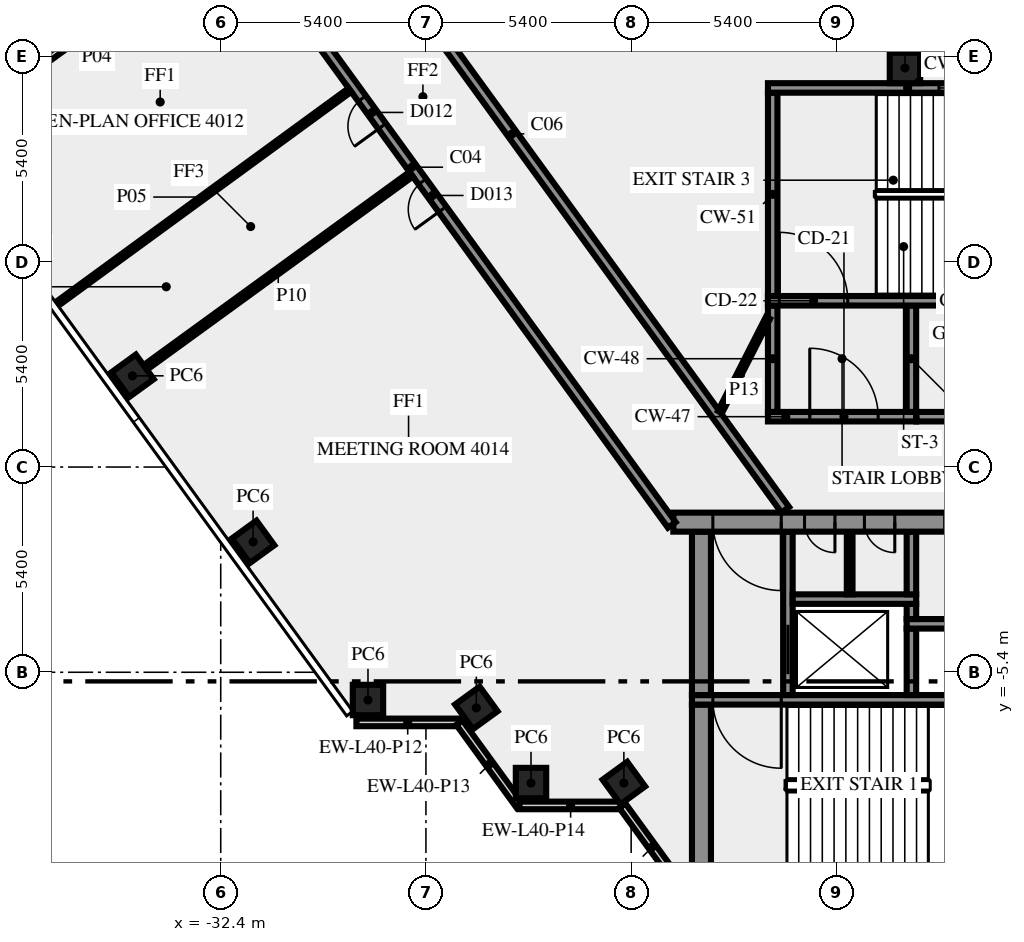
"""IFC4 building model, lengths in metres.
Left out: names, types, materials, properties, quantities, classifications, styles, units other than length and angle.
Written with IfcOpenShell. Run it as: python <this file> out.ifc"""

import sys

from ifc_helpers import new_model, si_unit, direction, frame, frame_2d, origin, origin_2d, place, context, subcontext, project, spatial, rectangle, extrude, element, fill, save


model = new_model("IFC4")
c1 = context("Model", 3, precision=1e-05, world=origin(), true_north=direction((0.0, 1.0)))
c2 = subcontext(c1, "Body", "Model", "MODEL_VIEW")
j1 = project(units=[si_unit("LENGTHUNIT", "METRE"), si_unit("PLANEANGLEUNIT", "RADIAN")], contexts=[c1])
p1 = place(None, origin())
s1 = spatial("IfcSite", under=j1, at=p1, CompositionType="ELEMENT")
p2 = place(p1, origin())
s2 = spatial("IfcBuilding", under=s1, at=p2, CompositionType="ELEMENT")
p3 = place(p2, frame((0.0, 0.0, 172.0)))
s3 = spatial("IfcBuildingStorey", under=s2, at=p3, CompositionType="ELEMENT", Elevation=172.0)
for number, where, z_axis, x_axis in (
    (1, (-34.722, 2.4, 0.0), (0.0, 0.0, 1.0), (0.588, -0.809, 0.0)),
    (2, (-31.548, -1.969, 0.0), (0.0, 0.0, 1.0), (0.588, -0.809, 0.0)),
    (3, (-28.525, -6.13, 0.0), (0.0, 0.0, 1.0), (1.0, 0.0, 0.0)),
    (4, (-25.674, -6.337, 0.0), (0.0, 0.0, 1.0), (0.588, -0.809, 0.0)),
    (5, (-24.235, -8.315, 0.0), (0.0, 0.0, 1.0), (1.0, 0.0, 0.0)),
    (6, (-21.792, -8.315, 0.0), (0.0, 0.0, 1.0), (0.588, -0.809, 0.0)),
    (7, (-14.395, 10.5, 0.0), (0.0, 0.0, 1.0), (-1.0, 0.0, 0.0)),
):
    element("IfcColumn", number, at=place(p3, frame(where, z_axis=z_axis, x_axis=x_axis)), inside=s3, PredefinedType="COLUMN", context=c2, shape_type="SweptSolid", body=[
        extrude(rectangle(XDim=0.8, YDim=0.8, at=origin_2d()), origin(), (0.0, 0.0, 1.0), 3.65),
    ])
p4 = place(p3, frame((-28.83, -6.719, 0.0), z_axis=(0.0, 0.0, 1.0), x_axis=(1.0, 0.0, 0.0)))
e8 = element("IfcWall", 8, at=p4, inside=s3, PredefinedType="SOLIDWALL", context=c2, shape_type="SweptSolid", body=[
    extrude(rectangle(XDim=2.7, YDim=0.2, at=frame_2d((1.35, 0.0))), origin(), (0.0, 0.0, 1.0), 3.65),
])
p5 = place(p3, frame((-26.12, -6.724, 0.0), z_axis=(0.0, 0.0, 1.0), x_axis=(0.587720002413, -0.809064397168, 0.0)))
e9 = element("IfcWall", 9, at=p5, inside=s3, PredefinedType="SOLIDWALL", context=c2, shape_type="SweptSolid", body=[
    extrude(rectangle(XDim=2.7, YDim=0.2, at=frame_2d((1.35, 0.0))), origin(), (0.0, 0.0, 1.0), 3.65),
])
p6 = place(p3, frame((-24.543, -8.904, 0.0), z_axis=(0.0, 0.0, 1.0), x_axis=(1.0, 0.0, 0.0)))
e10 = element("IfcWall", 10, at=p6, inside=s3, PredefinedType="SOLIDWALL", context=c2, shape_type="SweptSolid", body=[
    extrude(rectangle(XDim=2.7, YDim=0.2, at=frame_2d((1.35, 0.0))), origin(), (0.0, 0.0, 1.0), 3.65),
])
p7 = place(p3, frame((-21.833, -8.909, 0.0), z_axis=(0.0, 0.0, 1.0), x_axis=(0.587766567315, -0.809030569476, 0.0)))
e11 = element("IfcWall", 11, at=p7, inside=s3, PredefinedType="SOLIDWALL", context=c2, shape_type="SweptSolid", body=[
    extrude(rectangle(XDim=2.688, YDim=0.2, at=frame_2d((1.344, 0.0))), origin(), (0.0, 0.0, 1.0), 3.65),
])
p8 = place(p3, frame((-19.75, -10.5, 0.0), z_axis=(0.0, 0.0, 1.0), x_axis=(0.0, 1.0, 0.0)))
e12 = element("IfcWall", 12, at=p8, inside=s3, PredefinedType="SHEAR", context=c2, shape_type="SweptSolid", body=[
    extrude(rectangle(XDim=4.25, YDim=0.5, at=frame_2d((2.125, 0.0))), origin(), (0.0, 0.0, 1.0), 3.65),
])
p9 = place(p3, frame((-9.8, -6.125, 0.0), z_axis=(0.0, 0.0, 1.0), x_axis=(-1.0, 0.0, 0.0)))
e13 = element("IfcWall", 13, at=p9, inside=s3, PredefinedType="SHEAR", context=c2, shape_type="SweptSolid", body=[
    extrude(rectangle(XDim=10.2, YDim=0.25, at=frame_2d((5.1, 0.0))), origin(), (0.0, 0.0, 1.0), 3.65),
])
p10 = place(p9, frame((7.85, 0.0, 0.0)))
e14 = element("IfcOpeningElement", 14, at=p10, cuts=e13, PredefinedType="OPENING", context=c2, shape_type="SweptSolid", body=[
    extrude(rectangle(XDim=1.8, YDim=2.1, at=frame_2d((0.9, 1.05))), frame((0.0, 0.135, 0.0), z_axis=(0.0, -1.0, 0.0), x_axis=(1.0, 0.0, 0.0)), (0.0, 0.0, 1.0), 0.27),
])
p11 = place(p3, frame((-19.75, -6.0, 0.0), z_axis=(0.0, 0.0, 1.0), x_axis=(0.0, 1.0, 0.0)))
e15 = element("IfcWall", 15, at=p11, inside=s3, PredefinedType="SHEAR", context=c2, shape_type="SweptSolid", body=[
    extrude(rectangle(XDim=4.3, YDim=0.5, at=frame_2d((2.15, 0.0))), origin(), (0.0, 0.0, 1.0), 3.65),
])
p12 = place(p3, frame((-17.475, -6.0, 0.0), z_axis=(0.0, 0.0, 1.0), x_axis=(0.0, 1.0, 0.0)))
e16 = element("IfcWall", 16, at=p12, inside=s3, PredefinedType="SHEAR", context=c2, shape_type="SweptSolid", body=[
    extrude(rectangle(XDim=4.3, YDim=0.25, at=frame_2d((2.15, 0.0))), origin(), (0.0, 0.0, 1.0), 3.65),
])
p13 = place(p12, frame((0.55, 0.0, 0.0)))
e17 = element("IfcOpeningElement", 17, at=p13, cuts=e16, PredefinedType="OPENING", context=c2, shape_type="SweptSolid", body=[
    extrude(rectangle(XDim=1.3, YDim=2.1, at=frame_2d((0.65, 1.05))), frame((0.0, 0.135, 0.0), z_axis=(0.0, -1.0, 0.0), x_axis=(1.0, 0.0, 0.0)), (0.0, 0.0, 1.0), 0.27),
])
p14 = place(p3, frame((-14.225, -6.0, 0.0), z_axis=(0.0, 0.0, 1.0), x_axis=(0.0, 1.0, 0.0)))
e18 = element("IfcWall", 18, at=p14, inside=s3, PredefinedType="SHEAR", context=c2, shape_type="SweptSolid", body=[
    extrude(rectangle(XDim=1.75, YDim=0.25, at=frame_2d((0.875, 0.0))), origin(), (0.0, 0.0, 1.0), 3.65),
])
p15 = place(p3, frame((-14.35, -4.125, 0.0), z_axis=(0.0, 0.0, 1.0), x_axis=(1.0, 0.0, 0.0)))
e19 = element("IfcWall", 19, at=p15, inside=s3, PredefinedType="SHEAR", context=c2, shape_type="SweptSolid", body=[
    extrude(rectangle(XDim=10.4, YDim=0.25, at=frame_2d((5.2, 0.0))), origin(), (0.0, 0.0, 1.0), 3.65),
])
p16 = place(p3, frame((-14.225, -4.0, 0.0), z_axis=(0.0, 0.0, 1.0), x_axis=(0.0, 1.0, 0.0)))
e20 = element("IfcWall", 20, at=p16, inside=s3, PredefinedType="SHEAR", context=c2, shape_type="SweptSolid", body=[
    extrude(rectangle(XDim=0.4, YDim=0.25, at=frame_2d((0.2, 0.0))), origin(), (0.0, 0.0, 1.0), 3.65),
])
p17 = place(p3, frame((-17.35, -3.475, 0.0), z_axis=(0.0, 0.0, 1.0), x_axis=(1.0, 0.0, 0.0)))
e21 = element("IfcWall", 21, at=p17, inside=s3, PredefinedType="SHEAR", context=c2, shape_type="SweptSolid", body=[
    extrude(rectangle(XDim=3.25, YDim=0.25, at=frame_2d((1.625, 0.0))), origin(), (0.0, 0.0, 1.0), 3.65),
])
p18 = place(p3, frame((-15.85, -3.35, 0.0), z_axis=(0.0, 0.0, 1.0), x_axis=(0.0, 1.0, 0.0)))
e22 = element("IfcWall", 22, at=p18, inside=s3, PredefinedType="PARTITIONING", context=c2, shape_type="SweptSolid", body=[
    extrude(rectangle(XDim=1.65, YDim=0.15, at=frame_2d((0.825, 0.0))), origin(), (0.0, 0.0, 1.0), 3.65),
])
p19 = place(p3, frame((-14.225, -3.35, 0.0), z_axis=(0.0, 0.0, 1.0), x_axis=(0.0, 1.0, 0.0)))
e23 = element("IfcWall", 23, at=p19, inside=s3, PredefinedType="SHEAR", context=c2, shape_type="SweptSolid", body=[
    extrude(rectangle(XDim=1.65, YDim=0.25, at=frame_2d((0.825, 0.0))), origin(), (0.0, 0.0, 1.0), 3.65),
])
p20 = place(p3, frame((20.49, -1.45, 0.0), z_axis=(0.0, 0.0, 1.0), x_axis=(-1.0, 0.0, 0.0)))
e24 = element("IfcWall", 24, at=p20, inside=s3, PredefinedType="SHEAR", context=c2, shape_type="SweptSolid", body=[
    extrude(rectangle(XDim=40.98, YDim=0.5, at=frame_2d((20.49, 0.0))), origin(), (0.0, 0.0, 1.0), 3.65),
])
p21 = place(p20, frame((38.14, 0.0, 0.0)))
e25 = element("IfcOpeningElement", 25, at=p21, cuts=e24, PredefinedType="OPENING", context=c2, shape_type="SweptSolid", body=[
    extrude(rectangle(XDim=1.8, YDim=2.1, at=frame_2d((0.9, 1.05))), frame((0.0, 0.26, 0.0), z_axis=(0.0, -1.0, 0.0), x_axis=(1.0, 0.0, 0.0)), (0.0, 0.0, 1.0), 0.52),
])
p22 = place(p20, frame((36.728, 0.0, 0.0)))
e26 = element("IfcOpeningElement", 26, at=p22, cuts=e24, PredefinedType="OPENING", context=c2, shape_type="SweptSolid", body=[
    extrude(rectangle(XDim=0.8, YDim=2.1, at=frame_2d((0.4, 1.05))), frame((0.0, 0.26, 0.0), z_axis=(0.0, -1.0, 0.0), x_axis=(1.0, 0.0, 0.0)), (0.0, 0.0, 1.0), 0.52),
])
p23 = place(p20, frame((35.153, 0.0, 0.0)))
e27 = element("IfcOpeningElement", 27, at=p23, cuts=e24, PredefinedType="OPENING", context=c2, shape_type="SweptSolid", body=[
    extrude(rectangle(XDim=0.8, YDim=2.1, at=frame_2d((0.4, 1.05))), frame((0.0, 0.26, 0.0), z_axis=(0.0, -1.0, 0.0), x_axis=(1.0, 0.0, 0.0)), (0.0, 0.0, 1.0), 0.52),
])
p24 = place(p20, frame((32.94, 0.0, 0.0)))
e28 = element("IfcOpeningElement", 28, at=p24, cuts=e24, PredefinedType="OPENING", context=c2, shape_type="SweptSolid", body=[
    extrude(rectangle(XDim=0.9, YDim=2.1, at=frame_2d((0.45, 1.05))), frame((0.0, 0.26, 0.0), z_axis=(0.0, -1.0, 0.0), x_axis=(1.0, 0.0, 0.0)), (0.0, 0.0, 1.0), 0.52),
])
p25 = place(p20, frame((27.84, 0.0, 0.0)))
e29 = element("IfcOpeningElement", 29, at=p25, cuts=e24, PredefinedType="OPENING", context=c2, shape_type="SweptSolid", body=[
    extrude(rectangle(XDim=0.9, YDim=2.1, at=frame_2d((0.45, 1.05))), frame((0.0, 0.26, 0.0), z_axis=(0.0, -1.0, 0.0), x_axis=(1.0, 0.0, 0.0)), (0.0, 0.0, 1.0), 0.52),
])
p26 = place(p20, frame((21.765, 0.0, 0.0)))
e30 = element("IfcOpeningElement", 30, at=p26, cuts=e24, PredefinedType="OPENING", context=c2, shape_type="SweptSolid", body=[
    extrude(rectangle(XDim=2.0, YDim=2.1, at=frame_2d((1.0, 1.05))), frame((0.0, 0.26, 0.0), z_axis=(0.0, -1.0, 0.0), x_axis=(1.0, 0.0, 0.0)), (0.0, 0.0, 1.0), 0.52),
])
p27 = place(p20, frame((7.14, 0.0, 0.0)))
e31 = element("IfcOpeningElement", 31, at=p27, cuts=e24, PredefinedType="OPENING", context=c2, shape_type="SweptSolid", body=[
    extrude(rectangle(XDim=0.9, YDim=2.1, at=frame_2d((0.45, 1.05))), frame((0.0, 0.26, 0.0), z_axis=(0.0, -1.0, 0.0), x_axis=(1.0, 0.0, 0.0)), (0.0, 0.0, 1.0), 0.52),
])
p28 = place(p20, frame((4.19, 0.0, 0.0)))
e32 = element("IfcOpeningElement", 32, at=p28, cuts=e24, PredefinedType="OPENING", context=c2, shape_type="SweptSolid", body=[
    extrude(rectangle(XDim=0.9, YDim=2.1, at=frame_2d((0.45, 1.05))), frame((0.0, 0.26, 0.0), z_axis=(0.0, -1.0, 0.0), x_axis=(1.0, 0.0, 0.0)), (0.0, 0.0, 1.0), 0.52),
])
p29 = place(p20, frame((1.04, 0.0, 0.0)))
e33 = element("IfcOpeningElement", 33, at=p29, cuts=e24, PredefinedType="OPENING", context=c2, shape_type="SweptSolid", body=[
    extrude(rectangle(XDim=1.8, YDim=2.1, at=frame_2d((0.9, 1.05))), frame((0.0, 0.26, 0.0), z_axis=(0.0, -1.0, 0.0), x_axis=(1.0, 0.0, 0.0)), (0.0, 0.0, 1.0), 0.52),
])
p30 = place(p3, frame((-18.0, 1.325, 0.0), z_axis=(0.0, 0.0, 1.0), x_axis=(1.0, 0.0, 0.0)))
e34 = element("IfcWall", 34, at=p30, inside=s3, PredefinedType="SHEAR", context=c2, shape_type="SweptSolid", body=[
    extrude(rectangle(XDim=3.9, YDim=0.25, at=frame_2d((1.95, 0.0))), origin(), (0.0, 0.0, 1.0), 3.65),
])
p31 = place(p30, frame((1.1, 0.0, 0.0)))
e35 = element("IfcOpeningElement", 35, at=p31, cuts=e34, PredefinedType="OPENING", context=c2, shape_type="SweptSolid", body=[
    extrude(rectangle(XDim=1.8, YDim=2.1, at=frame_2d((0.9, 1.05))), frame((0.0, 0.135, 0.0), z_axis=(0.0, -1.0, 0.0), x_axis=(1.0, 0.0, 0.0)), (0.0, 0.0, 1.0), 0.27),
])
for number, where, z_axis, x_axis in (
    (36, (-17.875, 1.45, 0.0), (0.0, 0.0, 1.0), (0.0, 1.0, 0.0)),
    (37, (-14.225, 1.45, 0.0), (0.0, 0.0, 1.0), (0.0, 1.0, 0.0)),
):
    element("IfcWall", number, at=place(p3, frame(where, z_axis=z_axis, x_axis=x_axis)), inside=s3, PredefinedType="SHEAR", context=c2, shape_type="SweptSolid", body=[
        extrude(rectangle(XDim=2.8, YDim=0.25, at=frame_2d((1.4, 0.0))), origin(), (0.0, 0.0, 1.0), 3.65),
    ])
p32 = place(p3, frame((-18.0, 4.375, 0.0), z_axis=(0.0, 0.0, 1.0), x_axis=(1.0, 0.0, 0.0)))
e38 = element("IfcWall", 38, at=p32, inside=s3, PredefinedType="SHEAR", context=c2, shape_type="SweptSolid", body=[
    extrude(rectangle(XDim=10.5, YDim=0.25, at=frame_2d((5.25, 0.0))), origin(), (0.0, 0.0, 1.0), 3.65),
])
p33 = place(p32, frame((0.3, 0.0, 0.0)))
e39 = element("IfcOpeningElement", 39, at=p33, cuts=e38, PredefinedType="OPENING", context=c2, shape_type="SweptSolid", body=[
    extrude(rectangle(XDim=1.8, YDim=2.1, at=frame_2d((0.9, 1.05))), frame((0.0, 0.135, 0.0), z_axis=(0.0, -1.0, 0.0), x_axis=(1.0, 0.0, 0.0)), (0.0, 0.0, 1.0), 0.27),
])
p34 = place(p3, frame((-17.875, 4.5, 0.0), z_axis=(0.0, 0.0, 1.0), x_axis=(0.0, 1.0, 0.0)))
e40 = element("IfcWall", 40, at=p34, inside=s3, PredefinedType="SHEAR", context=c2, shape_type="SweptSolid", body=[
    extrude(rectangle(XDim=5.35, YDim=0.25, at=frame_2d((2.675, 0.0))), origin(), (0.0, 0.0, 1.0), 3.65),
])
p35 = place(p3, frame((-18.0, 9.975, 0.0), z_axis=(0.0, 0.0, 1.0), x_axis=(1.0, 0.0, 0.0)))
e41 = element("IfcWall", 41, at=p35, inside=s3, PredefinedType="SHEAR", context=c2, shape_type="SweptSolid", body=[
    extrude(rectangle(XDim=10.5, YDim=0.25, at=frame_2d((5.25, 0.0))), origin(), (0.0, 0.0, 1.0), 3.65),
])
p36 = place(p35, frame((4.5, 0.0, 1.0)))
e42 = element("IfcOpeningElement", 42, at=p36, cuts=e41, PredefinedType="OPENING", context=c2, shape_type="SweptSolid", body=[
    extrude(rectangle(XDim=1.2, YDim=1.2, at=frame_2d((0.6, 0.6))), frame((0.0, 0.135, 0.0), z_axis=(0.0, -1.0, 0.0), x_axis=(1.0, 0.0, 0.0)), (0.0, 0.0, 1.0), 0.27),
])
p37 = place(p3, frame((-20.531, -1.523, 0.0), z_axis=(0.0, 0.0, 1.0), x_axis=(-0.587784239999, 0.809017729849, 0.0)))
e43 = element("IfcWall", 43, at=p37, inside=s3, PredefinedType="SOLIDWALL", context=c2, shape_type="SweptSolid", body=[
    extrude(rectangle(XDim=23.271, YDim=0.25, at=frame_2d((11.635, 0.0))), origin(), (0.0, 0.0, 1.0), 3.65),
])
p38 = place(p37, frame((18.366, 0.0, 0.0)))
e44 = element("IfcOpeningElement", 44, at=p38, cuts=e43, PredefinedType="OPENING", context=c2, shape_type="SweptSolid", body=[
    extrude(rectangle(XDim=0.9, YDim=2.1, at=frame_2d((0.45, 1.05))), frame((0.0, 0.135, 0.0), z_axis=(0.0, -1.0, 0.0), x_axis=(1.0, 0.0, 0.0)), (0.0, 0.0, 1.0), 0.27),
])
p39 = place(p37, frame((10.266, 0.0, 0.0)))
e45 = element("IfcOpeningElement", 45, at=p39, cuts=e43, PredefinedType="OPENING", context=c2, shape_type="SweptSolid", body=[
    extrude(rectangle(XDim=0.9, YDim=2.1, at=frame_2d((0.45, 1.05))), frame((0.0, 0.135, 0.0), z_axis=(0.0, -1.0, 0.0), x_axis=(1.0, 0.0, 0.0)), (0.0, 0.0, 1.0), 0.27),
])
p40 = place(p37, frame((21.896, 0.0, 0.0)))
e46 = element("IfcOpeningElement", 46, at=p40, cuts=e43, PredefinedType="OPENING", context=c2, shape_type="SweptSolid", body=[
    extrude(rectangle(XDim=0.9, YDim=2.1, at=frame_2d((0.45, 1.05))), frame((0.0, 0.135, 0.0), z_axis=(0.0, -1.0, 0.0), x_axis=(1.0, 0.0, 0.0)), (0.0, 0.0, 1.0), 0.27),
])
p41 = place(p37, frame((12.966, 0.0, 0.0)))
e47 = element("IfcOpeningElement", 47, at=p41, cuts=e43, PredefinedType="OPENING", context=c2, shape_type="SweptSolid", body=[
    extrude(rectangle(XDim=0.9, YDim=2.1, at=frame_2d((0.45, 1.05))), frame((0.0, 0.135, 0.0), z_axis=(0.0, -1.0, 0.0), x_axis=(1.0, 0.0, 0.0)), (0.0, 0.0, 1.0), 0.27),
])
p42 = place(p3, frame((-31.918, 18.658, 0.0), z_axis=(0.0, 0.0, 1.0), x_axis=(0.587788731405, -0.80901446664, 0.0)))
e48 = element("IfcWall", 48, at=p42, inside=s3, PredefinedType="SOLIDWALL", context=c2, shape_type="SweptSolid", body=[
    extrude(rectangle(XDim=24.453, YDim=0.25, at=frame_2d((12.227, 0.0))), origin(), (0.0, 0.0, 1.0), 3.65),
])
p43 = place(p42, frame((0.224, 0.0, 0.0)))
e49 = element("IfcOpeningElement", 49, at=p43, cuts=e48, PredefinedType="OPENING", context=c2, shape_type="SweptSolid", body=[
    extrude(rectangle(XDim=0.9, YDim=2.1, at=frame_2d((0.45, 1.05))), frame((0.0, 0.135, 0.0), z_axis=(0.0, -1.0, 0.0), x_axis=(1.0, 0.0, 0.0)), (0.0, 0.0, 1.0), 0.27),
])
p44 = place(p3, frame((-14.09, 1.325, 0.0), z_axis=(0.0, 0.0, 1.0), x_axis=(1.0, 0.0, 0.0)))
e50 = element("IfcWall", 50, at=p44, inside=s3, PredefinedType="SOLIDWALL", context=c2, shape_type="SweptSolid", body=[
    extrude(rectangle(XDim=9.431, YDim=0.25, at=frame_2d((4.716, 0.0))), origin(), (0.0, 0.0, 1.0), 3.65),
])
p45 = place(p44, frame((8.09, 0.0, 0.0)))
e51 = element("IfcOpeningElement", 51, at=p45, cuts=e50, PredefinedType="OPENING", context=c2, shape_type="SweptSolid", body=[
    extrude(rectangle(XDim=0.9, YDim=2.1, at=frame_2d((0.45, 1.05))), frame((0.0, 0.135, 0.0), z_axis=(0.0, -1.0, 0.0), x_axis=(1.0, 0.0, 0.0)), (0.0, 0.0, 1.0), 0.27),
])
p46 = place(p3, frame((-32.15, 14.256, 0.0), z_axis=(0.0, 0.0, 1.0), x_axis=(-0.809064299351, -0.587720137068, 0.0)))
e52 = element("IfcWall", 52, at=p46, inside=s3, PredefinedType="SOLIDWALL", context=c2, shape_type="SweptSolid", body=[
    extrude(rectangle(XDim=9.55, YDim=0.2, at=frame_2d((4.775, 0.0))), origin(), (0.0, 0.0, 1.0), 2.85),
])
p47 = place(p3, frame((-36.712, 4.288, 0.0), z_axis=(0.0, 0.0, 1.0), x_axis=(0.807606997933, 0.589721067023, 0.0)))
e53 = element("IfcWall", 53, at=p47, inside=s3, PredefinedType="PARTITIONING", context=c2, shape_type="SweptSolid", body=[
    extrude(rectangle(XDim=9.55, YDim=0.12, at=frame_2d((4.775, 0.0))), origin(), (0.0, 0.0, 1.0), 2.85),
])
p48 = place(p3, frame((-27.389, 7.703, 0.0), z_axis=(0.0, 0.0, 1.0), x_axis=(-0.809060825193, -0.587724919617, 0.0)))
e54 = element("IfcWall", 54, at=p48, inside=s3, PredefinedType="PARTITIONING", context=c2, shape_type="SweptSolid", body=[
    extrude(rectangle(XDim=8.645, YDim=0.15, at=frame_2d((4.322, 0.0))), origin(), (0.0, 0.0, 1.0), 3.65),
])
p49 = place(p3, frame((-19.261, 1.45, 0.0), z_axis=(0.0, 0.0, 1.0), x_axis=(0.453950796792, 0.891026752736, 0.0)))
e55 = element("IfcWall", 55, at=p49, inside=s3, PredefinedType="PARTITIONING", context=c2, shape_type="SweptSolid", body=[
    extrude(rectangle(XDim=2.778, YDim=0.12, at=frame_2d((1.389, 0.0))), origin(), (0.0, 0.0, 1.0), 3.65),
])
p50 = place(p10, origin())
e56 = element("IfcDoor", 56, at=p50, inside=s3, OperationType="DOUBLE_DOOR_SINGLE_SWING", PredefinedType="DOOR", context=c2, shape_type="SweptSolid", body=[
    extrude(rectangle(XDim=1.8, YDim=2.1, at=frame_2d((0.9, 1.05))), frame((0.0, 0.025, 0.0), z_axis=(0.0, -1.0, 0.0), x_axis=(1.0, 0.0, 0.0)), (0.0, 0.0, 1.0), 0.05),
])
fill(e14, e56)
p51 = place(p13, origin())
e57 = element("IfcDoor", 57, at=p51, inside=s3, OperationType="DOUBLE_DOOR_SLIDING", PredefinedType="DOOR", context=c2, shape_type="SweptSolid", body=[
    extrude(rectangle(XDim=1.3, YDim=2.1, at=frame_2d((0.65, 1.05))), frame((0.0, 0.025, 0.0), z_axis=(0.0, -1.0, 0.0), x_axis=(1.0, 0.0, 0.0)), (0.0, 0.0, 1.0), 0.05),
])
fill(e17, e57)
p52 = place(p21, origin())
e58 = element("IfcDoor", 58, at=p52, inside=s3, OperationType="DOUBLE_DOOR_SINGLE_SWING", PredefinedType="DOOR", context=c2, shape_type="SweptSolid", body=[
    extrude(rectangle(XDim=1.8, YDim=2.1, at=frame_2d((0.9, 1.05))), frame((0.0, 0.025, 0.0), z_axis=(0.0, -1.0, 0.0), x_axis=(1.0, 0.0, 0.0)), (0.0, 0.0, 1.0), 0.05),
])
fill(e25, e58)
p53 = place(p22, origin())
e59 = element("IfcDoor", 59, at=p53, inside=s3, OperationType="SINGLE_SWING_RIGHT", PredefinedType="DOOR", context=c2, shape_type="SweptSolid", body=[
    extrude(rectangle(XDim=0.8, YDim=2.1, at=frame_2d((0.4, 1.05))), frame((0.0, 0.025, 0.0), z_axis=(0.0, -1.0, 0.0), x_axis=(1.0, 0.0, 0.0)), (0.0, 0.0, 1.0), 0.05),
])
fill(e26, e59)
p54 = place(p23, origin())
e60 = element("IfcDoor", 60, at=p54, inside=s3, OperationType="SINGLE_SWING_RIGHT", PredefinedType="DOOR", context=c2, shape_type="SweptSolid", body=[
    extrude(rectangle(XDim=0.8, YDim=2.1, at=frame_2d((0.4, 1.05))), frame((0.0, 0.025, 0.0), z_axis=(0.0, -1.0, 0.0), x_axis=(1.0, 0.0, 0.0)), (0.0, 0.0, 1.0), 0.05),
])
fill(e27, e60)
p55 = place(p31, origin())
e61 = element("IfcDoor", 61, at=p55, inside=s3, OperationType="DOUBLE_DOOR_SINGLE_SWING", PredefinedType="DOOR", context=c2, shape_type="SweptSolid", body=[
    extrude(rectangle(XDim=1.8, YDim=2.1, at=frame_2d((0.9, 1.05))), frame((0.0, 0.025, 0.0), z_axis=(0.0, -1.0, 0.0), x_axis=(1.0, 0.0, 0.0)), (0.0, 0.0, 1.0), 0.05),
])
fill(e35, e61)
p56 = place(p33, origin())
e62 = element("IfcDoor", 62, at=p56, inside=s3, OperationType="DOUBLE_DOOR_SINGLE_SWING", PredefinedType="DOOR", context=c2, shape_type="SweptSolid", body=[
    extrude(rectangle(XDim=1.8, YDim=2.1, at=frame_2d((0.9, 1.05))), frame((0.0, 0.025, 0.0), z_axis=(0.0, -1.0, 0.0), x_axis=(1.0, 0.0, 0.0)), (0.0, 0.0, 1.0), 0.05),
])
fill(e39, e62)
p57 = place(p36, origin())
e63 = element("IfcWindow", 63, at=p57, inside=s3, PartitioningType="SINGLE_PANEL", PredefinedType="WINDOW", context=c2, shape_type="SweptSolid", body=[
    extrude(rectangle(XDim=1.2, YDim=1.2, at=frame_2d((0.6, 0.6))), frame((0.0, 0.03, 0.0), z_axis=(0.0, -1.0, 0.0), x_axis=(1.0, 0.0, 0.0)), (0.0, 0.0, 1.0), 0.06),
])
fill(e42, e63)
p58 = place(p39, origin())
e64 = element("IfcDoor", 64, at=p58, inside=s3, OperationType="SINGLE_SWING_RIGHT", PredefinedType="DOOR", context=c2, shape_type="SweptSolid", body=[
    extrude(rectangle(XDim=0.9, YDim=2.1, at=frame_2d((0.45, 1.05))), frame((0.0, 0.025, 0.0), z_axis=(0.0, -1.0, 0.0), x_axis=(1.0, 0.0, 0.0)), (0.0, 0.0, 1.0), 0.05),
])
fill(e45, e64)
p59 = place(p41, origin())
e65 = element("IfcDoor", 65, at=p59, inside=s3, OperationType="SINGLE_SWING_RIGHT", PredefinedType="DOOR", context=c2, shape_type="SweptSolid", body=[
    extrude(rectangle(XDim=0.9, YDim=2.1, at=frame_2d((0.45, 1.05))), frame((0.0, 0.025, 0.0), z_axis=(0.0, -1.0, 0.0), x_axis=(1.0, 0.0, 0.0)), (0.0, 0.0, 1.0), 0.05),
])
fill(e47, e65)
save(model, sys.argv[1])
